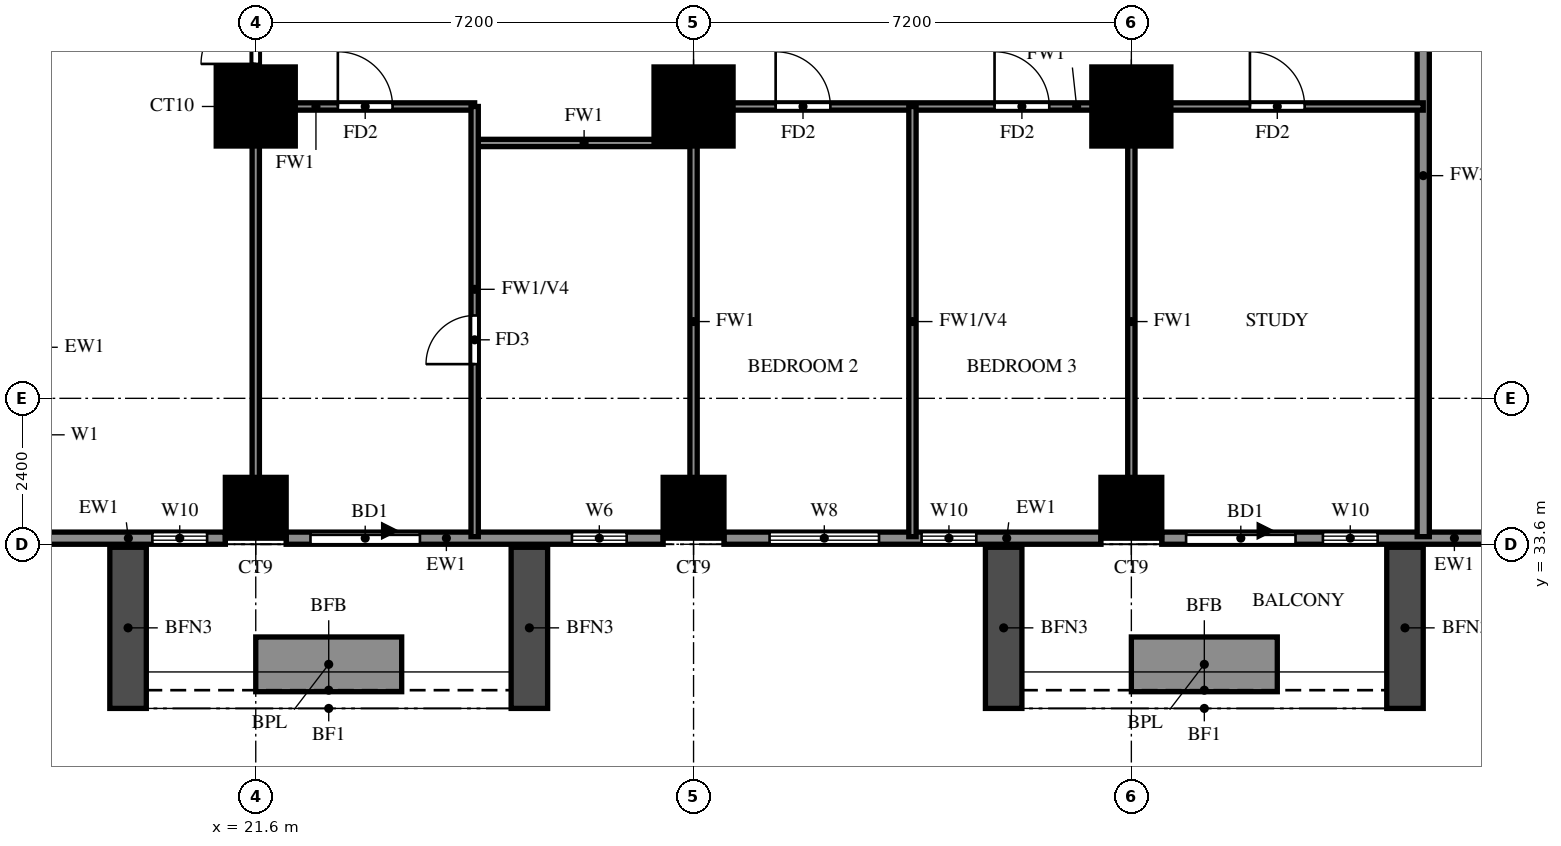
"""IFC4 building model, lengths in metres.
Left out: names, types, materials, properties, quantities, classifications, styles, units other than length and angle.
Written with IfcOpenShell. Run it as: python <this file> out.ifc"""

import sys

from ifc_helpers import new_model, si_unit, direction, frame, frame_2d, origin, origin_2d, place, context, subcontext, project, spatial, rectangle, extrude, source, transform, mapped, element, fill, save


model = new_model("IFC4")
c1 = context("Model", 3, precision=1e-05, world=origin(), true_north=direction((0.0, 1.0)))
c2 = subcontext(c1, "Body", "Model", "MODEL_VIEW")
j1 = project(units=[si_unit("LENGTHUNIT", "METRE"), si_unit("PLANEANGLEUNIT", "RADIAN")], contexts=[c1])
p1 = place(None, origin())
s1 = spatial("IfcSite", under=j1, at=p1, CompositionType="ELEMENT")
p2 = place(p1, origin())
s2 = spatial("IfcBuilding", under=s1, at=p2, CompositionType="ELEMENT")
p3 = place(p2, frame((0.0, 0.0, 76.0)))
s3 = spatial("IfcBuildingStorey", under=s2, at=p3, CompositionType="ELEMENT", Elevation=76.0)
m1 = source(origin(), c2, "Body", "SweptSolid", [
    extrude(rectangle(XDim=1.0, YDim=1.0, at=origin_2d()), origin(), (0.0, 0.0, 1.0), 3.18),
])
for number, where, z_axis, x_axis in (
    (1, (21.6, 34.2, 0.0), (0.0, 0.0, 1.0), (1.0, 0.0, 0.0)),
    (2, (28.8, 34.2, 0.0), (0.0, 0.0, 1.0), (1.0, 0.0, 0.0)),
    (3, (36.0, 34.2, 0.0), (0.0, 0.0, 1.0), (1.0, 0.0, 0.0)),
):
    element("IfcColumn", number, at=place(p3, frame(where, z_axis=z_axis, x_axis=x_axis)), inside=s3, PredefinedType="COLUMN", context=c2, shape_type="MappedRepresentation", body=[
        mapped(m1, transform((0.0, 0.0, 0.0))),
    ])
m2 = source(origin(), c2, "Body", "SweptSolid", [
    extrude(rectangle(XDim=1.3, YDim=1.3, at=origin_2d()), origin(), (0.0, 0.0, 1.0), 3.18),
])
for number, where, z_axis, x_axis in (
    (4, (21.6, 40.8, 0.0), (0.0, 0.0, 1.0), (1.0, 0.0, 0.0)),
    (5, (28.8, 40.8, 0.0), (0.0, 0.0, 1.0), (1.0, 0.0, 0.0)),
    (6, (36.0, 40.8, 0.0), (0.0, 0.0, 1.0), (1.0, 0.0, 0.0)),
):
    element("IfcColumn", number, at=place(p3, frame(where, z_axis=z_axis, x_axis=x_axis)), inside=s3, PredefinedType="COLUMN", context=c2, shape_type="MappedRepresentation", body=[
        mapped(m2, transform((0.0, 0.0, 0.0))),
    ])
p4 = place(p3, frame((18.2, 33.7, 0.0), z_axis=(0.0, 0.0, 1.0), x_axis=(1.0, 0.0, 0.0)))
e7 = element("IfcWall", 7, at=p4, inside=s3, PredefinedType="SOLIDWALL", context=c2, shape_type="SweptSolid", body=[
    extrude(rectangle(XDim=2.9, YDim=0.2, at=frame_2d((1.45, 0.0))), origin(), (0.0, 0.0, 1.0), 3.18),
])
p5 = place(p4, frame((1.7, 0.0, 0.6)))
e8 = element("IfcOpeningElement", 8, at=p5, cuts=e7, PredefinedType="OPENING", context=c2, shape_type="SweptSolid", body=[
    extrude(rectangle(XDim=0.9, YDim=2.4, at=frame_2d((0.45, 1.2))), frame((0.0, 0.11, 0.0), z_axis=(0.0, -1.0, 0.0), x_axis=(1.0, 0.0, 0.0)), (0.0, 0.0, 1.0), 0.22),
])
p6 = place(p3, frame((22.1, 33.7, 0.0), z_axis=(0.0, 0.0, 1.0), x_axis=(1.0, 0.0, 0.0)))
e9 = element("IfcWall", 9, at=p6, inside=s3, PredefinedType="SOLIDWALL", context=c2, shape_type="SweptSolid", body=[
    extrude(rectangle(XDim=6.2, YDim=0.2, at=frame_2d((3.1, 0.0))), origin(), (0.0, 0.0, 1.0), 3.18),
])
p7 = place(p6, frame((0.4, 0.0, 0.0)))
e10 = element("IfcOpeningElement", 10, at=p7, cuts=e9, PredefinedType="OPENING", context=c2, shape_type="SweptSolid", body=[
    extrude(rectangle(XDim=1.8, YDim=2.4, at=frame_2d((0.9, 1.2))), frame((0.0, 0.11, 0.0), z_axis=(0.0, -1.0, 0.0), x_axis=(1.0, 0.0, 0.0)), (0.0, 0.0, 1.0), 0.22),
])
p8 = place(p6, frame((4.7, 0.0, 1.5)))
e11 = element("IfcOpeningElement", 11, at=p8, cuts=e9, PredefinedType="OPENING", context=c2, shape_type="SweptSolid", body=[
    extrude(rectangle(XDim=0.9, YDim=0.9, at=frame_2d((0.45, 0.45))), frame((0.0, 0.11, 0.0), z_axis=(0.0, -1.0, 0.0), x_axis=(1.0, 0.0, 0.0)), (0.0, 0.0, 1.0), 0.22),
])
p9 = place(p3, frame((29.3, 33.7, 0.0), z_axis=(0.0, 0.0, 1.0), x_axis=(1.0, 0.0, 0.0)))
e12 = element("IfcWall", 12, at=p9, inside=s3, PredefinedType="SOLIDWALL", context=c2, shape_type="SweptSolid", body=[
    extrude(rectangle(XDim=6.2, YDim=0.2, at=frame_2d((3.1, 0.0))), origin(), (0.0, 0.0, 1.0), 3.18),
])
p10 = place(p9, frame((0.75, 0.0, 0.6)))
e13 = element("IfcOpeningElement", 13, at=p10, cuts=e12, PredefinedType="OPENING", context=c2, shape_type="SweptSolid", body=[
    extrude(rectangle(XDim=1.8, YDim=2.4, at=frame_2d((0.9, 1.2))), frame((0.0, 0.11, 0.0), z_axis=(0.0, -1.0, 0.0), x_axis=(1.0, 0.0, 0.0)), (0.0, 0.0, 1.0), 0.22),
])
p11 = place(p9, frame((3.25, 0.0, 0.6)))
e14 = element("IfcOpeningElement", 14, at=p11, cuts=e12, PredefinedType="OPENING", context=c2, shape_type="SweptSolid", body=[
    extrude(rectangle(XDim=0.9, YDim=2.4, at=frame_2d((0.45, 1.2))), frame((0.0, 0.11, 0.0), z_axis=(0.0, -1.0, 0.0), x_axis=(1.0, 0.0, 0.0)), (0.0, 0.0, 1.0), 0.22),
])
p12 = place(p3, frame((36.5, 33.7, 0.0), z_axis=(0.0, 0.0, 1.0), x_axis=(1.0, 0.0, 0.0)))
e15 = element("IfcWall", 15, at=p12, inside=s3, PredefinedType="SOLIDWALL", context=c2, shape_type="SweptSolid", body=[
    extrude(rectangle(XDim=5.5, YDim=0.2, at=frame_2d((2.75, 0.0))), origin(), (0.0, 0.0, 1.0), 3.18),
])
p13 = place(p12, frame((0.4, 0.0, 0.0)))
e16 = element("IfcOpeningElement", 16, at=p13, cuts=e15, PredefinedType="OPENING", context=c2, shape_type="SweptSolid", body=[
    extrude(rectangle(XDim=1.8, YDim=2.4, at=frame_2d((0.9, 1.2))), frame((0.0, 0.11, 0.0), z_axis=(0.0, -1.0, 0.0), x_axis=(1.0, 0.0, 0.0)), (0.0, 0.0, 1.0), 0.22),
])
p14 = place(p12, frame((2.65, 0.0, 0.6)))
e17 = element("IfcOpeningElement", 17, at=p14, cuts=e15, PredefinedType="OPENING", context=c2, shape_type="SweptSolid", body=[
    extrude(rectangle(XDim=0.9, YDim=2.4, at=frame_2d((0.45, 1.2))), frame((0.0, 0.11, 0.0), z_axis=(0.0, -1.0, 0.0), x_axis=(1.0, 0.0, 0.0)), (0.0, 0.0, 1.0), 0.22),
])
for number, where, z_axis, x_axis in (
    (18, (19.5, 33.55, 0.0), (0.0, 0.0, 1.0), (0.0, -1.0, 0.0)),
    (19, (26.1, 33.55, 0.0), (0.0, 0.0, 1.0), (0.0, -1.0, 0.0)),
):
    element("IfcWall", number, at=place(p3, frame(where, z_axis=z_axis, x_axis=x_axis)), inside=s3, PredefinedType="SOLIDWALL", context=c2, shape_type="SweptSolid", body=[
        extrude(rectangle(XDim=2.65, YDim=0.6, at=frame_2d((1.325, 0.0))), origin(), (0.0, 0.0, 1.0), 2.85),
    ])
p15 = place(p3, frame((21.6, 31.625, 0.0), z_axis=(0.0, 0.0, 1.0), x_axis=(1.0, 0.0, 0.0)))
e20 = element("IfcWall", 20, at=p15, inside=s3, PredefinedType="SOLIDWALL", context=c2, shape_type="SweptSolid", body=[
    extrude(rectangle(XDim=2.4, YDim=0.9, at=frame_2d((1.2, 0.0))), origin(), (0.0, 0.0, 1.0), 0.9),
])
for number, where, z_axis, x_axis in (
    (21, (33.9, 33.55, 0.0), (0.0, 0.0, 1.0), (0.0, -1.0, 0.0)),
    (22, (40.5, 33.55, 0.0), (0.0, 0.0, 1.0), (0.0, -1.0, 0.0)),
):
    element("IfcWall", number, at=place(p3, frame(where, z_axis=z_axis, x_axis=x_axis)), inside=s3, PredefinedType="SOLIDWALL", context=c2, shape_type="SweptSolid", body=[
        extrude(rectangle(XDim=2.65, YDim=0.6, at=frame_2d((1.325, 0.0))), origin(), (0.0, 0.0, 1.0), 2.85),
    ])
p16 = place(p3, frame((36.0, 31.625, 0.0), z_axis=(0.0, 0.0, 1.0), x_axis=(1.0, 0.0, 0.0)))
e23 = element("IfcWall", 23, at=p16, inside=s3, PredefinedType="SOLIDWALL", context=c2, shape_type="SweptSolid", body=[
    extrude(rectangle(XDim=2.4, YDim=0.9, at=frame_2d((1.2, 0.0))), origin(), (0.0, 0.0, 1.0), 0.9),
])
p17 = place(p3, frame((40.8, 33.725, 0.0), z_axis=(0.0, 0.0, 1.0), x_axis=(0.0, 1.0, 0.0)))
e24 = element("IfcWall", 24, at=p17, inside=s3, PredefinedType="SOLIDWALL", context=c2, shape_type="SweptSolid", body=[
    extrude(rectangle(XDim=11.875, YDim=0.2, at=frame_2d((5.938, 0.0))), origin(), (0.0, 0.0, 1.0), 2.28),
])
p18 = place(p3, frame((25.2, 40.2, 0.0), z_axis=(0.0, 0.0, 1.0), x_axis=(1.0, 0.0, 0.0)))
e25 = element("IfcWall", 25, at=p18, inside=s3, PredefinedType="PARTITIONING", context=c2, shape_type="SweptSolid", body=[
    extrude(rectangle(XDim=3.6, YDim=0.12, at=frame_2d((1.8, 0.0))), origin(), (0.0, 0.0, 1.0), 3.18),
])
p19 = place(p3, frame((21.6, 40.8, 0.0), z_axis=(0.0, 0.0, 1.0), x_axis=(1.0, 0.0, 0.0)))
e26 = element("IfcWall", 26, at=p19, inside=s3, PredefinedType="PARTITIONING", context=c2, shape_type="SweptSolid", body=[
    extrude(rectangle(XDim=3.6, YDim=0.12, at=frame_2d((1.8, 0.0))), origin(), (0.0, 0.0, 1.0), 3.18),
])
p20 = place(p19, frame((1.35, 0.0, 0.0)))
e27 = element("IfcOpeningElement", 27, at=p20, cuts=e26, PredefinedType="OPENING", context=c2, shape_type="SweptSolid", body=[
    extrude(rectangle(XDim=0.9, YDim=2.1, at=frame_2d((0.45, 1.05))), frame((0.0, 0.07, 0.0), z_axis=(0.0, -1.0, 0.0), x_axis=(1.0, 0.0, 0.0)), (0.0, 0.0, 1.0), 0.14),
])
p21 = place(p3, frame((28.8, 40.8, 0.0), z_axis=(0.0, 0.0, 1.0), x_axis=(1.0, 0.0, 0.0)))
e28 = element("IfcWall", 28, at=p21, inside=s3, PredefinedType="PARTITIONING", context=c2, shape_type="SweptSolid", body=[
    extrude(rectangle(XDim=12.0, YDim=0.12, at=frame_2d((6.0, 0.0))), origin(), (0.0, 0.0, 1.0), 3.18),
])
p22 = place(p21, frame((1.35, 0.0, 0.0)))
e29 = element("IfcOpeningElement", 29, at=p22, cuts=e28, PredefinedType="OPENING", context=c2, shape_type="SweptSolid", body=[
    extrude(rectangle(XDim=0.9, YDim=2.1, at=frame_2d((0.45, 1.05))), frame((0.0, 0.07, 0.0), z_axis=(0.0, -1.0, 0.0), x_axis=(1.0, 0.0, 0.0)), (0.0, 0.0, 1.0), 0.14),
])
p23 = place(p21, frame((4.95, 0.0, 0.0)))
e30 = element("IfcOpeningElement", 30, at=p23, cuts=e28, PredefinedType="OPENING", context=c2, shape_type="SweptSolid", body=[
    extrude(rectangle(XDim=0.9, YDim=2.1, at=frame_2d((0.45, 1.05))), frame((0.0, 0.07, 0.0), z_axis=(0.0, -1.0, 0.0), x_axis=(1.0, 0.0, 0.0)), (0.0, 0.0, 1.0), 0.14),
])
p24 = place(p21, frame((9.15, 0.0, 0.0)))
e31 = element("IfcOpeningElement", 31, at=p24, cuts=e28, PredefinedType="OPENING", context=c2, shape_type="SweptSolid", body=[
    extrude(rectangle(XDim=0.9, YDim=2.1, at=frame_2d((0.45, 1.05))), frame((0.0, 0.07, 0.0), z_axis=(0.0, -1.0, 0.0), x_axis=(1.0, 0.0, 0.0)), (0.0, 0.0, 1.0), 0.14),
])
p25 = place(p3, frame((21.6, 33.725, 0.0), z_axis=(0.0, 0.0, 1.0), x_axis=(0.0, 1.0, 0.0)))
e32 = element("IfcWall", 32, at=p25, inside=s3, PredefinedType="PARTITIONING", context=c2, shape_type="SweptSolid", body=[
    extrude(rectangle(XDim=39.475, YDim=0.12, at=frame_2d((19.737, 0.0))), origin(), (0.0, 0.0, 1.0), 3.18),
])
p26 = place(p25, frame((7.775, 0.0, 0.0)))
e33 = element("IfcOpeningElement", 33, at=p26, cuts=e32, PredefinedType="OPENING", context=c2, shape_type="SweptSolid", body=[
    extrude(rectangle(XDim=0.9, YDim=2.1, at=frame_2d((0.45, 1.05))), frame((0.0, 0.07, 0.0), z_axis=(0.0, -1.0, 0.0), x_axis=(1.0, 0.0, 0.0)), (0.0, 0.0, 1.0), 0.14),
])
p27 = place(p25, frame((17.125, 0.0, 0.0)))
e34 = element("IfcOpeningElement", 34, at=p27, cuts=e32, PredefinedType="OPENING", context=c2, shape_type="SweptSolid", body=[
    extrude(rectangle(XDim=1.5, YDim=2.1, at=frame_2d((0.75, 1.05))), frame((0.0, 0.07, 0.0), z_axis=(0.0, -1.0, 0.0), x_axis=(1.0, 0.0, 0.0)), (0.0, 0.0, 1.0), 0.14),
])
p28 = place(p25, frame((22.825, 0.0, 0.0)))
e35 = element("IfcOpeningElement", 35, at=p28, cuts=e32, PredefinedType="OPENING", context=c2, shape_type="SweptSolid", body=[
    extrude(rectangle(XDim=0.9, YDim=2.1, at=frame_2d((0.45, 1.05))), frame((0.0, 0.07, 0.0), z_axis=(0.0, -1.0, 0.0), x_axis=(1.0, 0.0, 0.0)), (0.0, 0.0, 1.0), 0.14),
])
p29 = place(p25, frame((26.425, 0.0, 0.0)))
e36 = element("IfcOpeningElement", 36, at=p29, cuts=e32, PredefinedType="OPENING", context=c2, shape_type="SweptSolid", body=[
    extrude(rectangle(XDim=0.9, YDim=2.1, at=frame_2d((0.45, 1.05))), frame((0.0, 0.07, 0.0), z_axis=(0.0, -1.0, 0.0), x_axis=(1.0, 0.0, 0.0)), (0.0, 0.0, 1.0), 0.14),
])
p30 = place(p25, frame((30.025, 0.0, 0.0)))
e37 = element("IfcOpeningElement", 37, at=p30, cuts=e32, PredefinedType="OPENING", context=c2, shape_type="SweptSolid", body=[
    extrude(rectangle(XDim=0.9, YDim=2.1, at=frame_2d((0.45, 1.05))), frame((0.0, 0.07, 0.0), z_axis=(0.0, -1.0, 0.0), x_axis=(1.0, 0.0, 0.0)), (0.0, 0.0, 1.0), 0.14),
])
p31 = place(p25, frame((33.625, 0.0, 0.0)))
e38 = element("IfcOpeningElement", 38, at=p31, cuts=e32, PredefinedType="OPENING", context=c2, shape_type="SweptSolid", body=[
    extrude(rectangle(XDim=0.9, YDim=2.1, at=frame_2d((0.45, 1.05))), frame((0.0, 0.07, 0.0), z_axis=(0.0, -1.0, 0.0), x_axis=(1.0, 0.0, 0.0)), (0.0, 0.0, 1.0), 0.14),
])
p32 = place(p25, frame((37.225, 0.0, 0.0)))
e39 = element("IfcOpeningElement", 39, at=p32, cuts=e32, PredefinedType="OPENING", context=c2, shape_type="SweptSolid", body=[
    extrude(rectangle(XDim=0.9, YDim=2.1, at=frame_2d((0.45, 1.05))), frame((0.0, 0.07, 0.0), z_axis=(0.0, -1.0, 0.0), x_axis=(1.0, 0.0, 0.0)), (0.0, 0.0, 1.0), 0.14),
])
p33 = place(p3, frame((25.2, 33.725, 0.0), z_axis=(0.0, 0.0, 1.0), x_axis=(0.0, 1.0, 0.0)))
e40 = element("IfcWall", 40, at=p33, inside=s3, PredefinedType="PARTITIONING", context=c2, shape_type="SweptSolid", body=[
    extrude(rectangle(XDim=7.075, YDim=0.12, at=frame_2d((3.538, 0.0))), origin(), (0.0, 0.0, 1.0), 2.28),
])
p34 = place(p33, frame((2.837, 0.0, 0.0)))
e41 = element("IfcOpeningElement", 41, at=p34, cuts=e40, PredefinedType="OPENING", context=c2, shape_type="SweptSolid", body=[
    extrude(rectangle(XDim=0.8, YDim=2.1, at=frame_2d((0.4, 1.05))), frame((0.0, 0.07, 0.0), z_axis=(0.0, -1.0, 0.0), x_axis=(1.0, 0.0, 0.0)), (0.0, 0.0, 1.0), 0.14),
])
p35 = place(p3, frame((28.8, 33.725, 0.0), z_axis=(0.0, 0.0, 1.0), x_axis=(0.0, 1.0, 0.0)))
e42 = element("IfcWall", 42, at=p35, inside=s3, PredefinedType="PARTITIONING", context=c2, shape_type="SweptSolid", body=[
    extrude(rectangle(XDim=7.075, YDim=0.12, at=frame_2d((3.538, 0.0))), origin(), (0.0, 0.0, 1.0), 3.18),
])
p36 = place(p3, frame((32.4, 33.725, 0.0), z_axis=(0.0, 0.0, 1.0), x_axis=(0.0, 1.0, 0.0)))
e43 = element("IfcWall", 43, at=p36, inside=s3, PredefinedType="PARTITIONING", context=c2, shape_type="SweptSolid", body=[
    extrude(rectangle(XDim=7.075, YDim=0.12, at=frame_2d((3.538, 0.0))), origin(), (0.0, 0.0, 1.0), 2.28),
])
p37 = place(p3, frame((36.0, 33.725, 0.0), z_axis=(0.0, 0.0, 1.0), x_axis=(0.0, 1.0, 0.0)))
e44 = element("IfcWall", 44, at=p37, inside=s3, PredefinedType="PARTITIONING", context=c2, shape_type="SweptSolid", body=[
    extrude(rectangle(XDim=7.075, YDim=0.12, at=frame_2d((3.538, 0.0))), origin(), (0.0, 0.0, 1.0), 3.18),
])
p38 = place(p5, origin())
e45 = element("IfcWindow", 45, at=p38, inside=s3, PartitioningType="SINGLE_PANEL", PredefinedType="WINDOW", context=c2, shape_type="SweptSolid", body=[
    extrude(rectangle(XDim=0.9, YDim=2.4, at=frame_2d((0.45, 1.2))), frame((0.0, 0.03, 0.0), z_axis=(0.0, -1.0, 0.0), x_axis=(1.0, 0.0, 0.0)), (0.0, 0.0, 1.0), 0.06),
])
fill(e8, e45)
p39 = place(p7, origin())
e46 = element("IfcDoor", 46, at=p39, inside=s3, OperationType="DOUBLE_DOOR_SLIDING", PredefinedType="DOOR", context=c2, shape_type="SweptSolid", body=[
    extrude(rectangle(XDim=1.8, YDim=2.4, at=frame_2d((0.9, 1.2))), frame((0.0, 0.025, 0.0), z_axis=(0.0, -1.0, 0.0), x_axis=(1.0, 0.0, 0.0)), (0.0, 0.0, 1.0), 0.05),
])
fill(e10, e46)
p40 = place(p8, origin())
e47 = element("IfcWindow", 47, at=p40, inside=s3, PartitioningType="SINGLE_PANEL", PredefinedType="WINDOW", context=c2, shape_type="SweptSolid", body=[
    extrude(rectangle(XDim=0.9, YDim=0.9, at=frame_2d((0.45, 0.45))), frame((0.0, 0.03, 0.0), z_axis=(0.0, -1.0, 0.0), x_axis=(1.0, 0.0, 0.0)), (0.0, 0.0, 1.0), 0.06),
])
fill(e11, e47)
p41 = place(p10, origin())
e48 = element("IfcWindow", 48, at=p41, inside=s3, PartitioningType="DOUBLE_PANEL_VERTICAL", PredefinedType="WINDOW", context=c2, shape_type="SweptSolid", body=[
    extrude(rectangle(XDim=1.8, YDim=2.4, at=frame_2d((0.9, 1.2))), frame((0.0, 0.03, 0.0), z_axis=(0.0, -1.0, 0.0), x_axis=(1.0, 0.0, 0.0)), (0.0, 0.0, 1.0), 0.06),
])
fill(e13, e48)
p42 = place(p11, origin())
e49 = element("IfcWindow", 49, at=p42, inside=s3, PartitioningType="SINGLE_PANEL", PredefinedType="WINDOW", context=c2, shape_type="SweptSolid", body=[
    extrude(rectangle(XDim=0.9, YDim=2.4, at=frame_2d((0.45, 1.2))), frame((0.0, 0.03, 0.0), z_axis=(0.0, -1.0, 0.0), x_axis=(1.0, 0.0, 0.0)), (0.0, 0.0, 1.0), 0.06),
])
fill(e14, e49)
p43 = place(p13, origin())
e50 = element("IfcDoor", 50, at=p43, inside=s3, OperationType="DOUBLE_DOOR_SLIDING", PredefinedType="DOOR", context=c2, shape_type="SweptSolid", body=[
    extrude(rectangle(XDim=1.8, YDim=2.4, at=frame_2d((0.9, 1.2))), frame((0.0, 0.025, 0.0), z_axis=(0.0, -1.0, 0.0), x_axis=(1.0, 0.0, 0.0)), (0.0, 0.0, 1.0), 0.05),
])
fill(e16, e50)
p44 = place(p14, origin())
e51 = element("IfcWindow", 51, at=p44, inside=s3, PartitioningType="SINGLE_PANEL", PredefinedType="WINDOW", context=c2, shape_type="SweptSolid", body=[
    extrude(rectangle(XDim=0.9, YDim=2.4, at=frame_2d((0.45, 1.2))), frame((0.0, 0.03, 0.0), z_axis=(0.0, -1.0, 0.0), x_axis=(1.0, 0.0, 0.0)), (0.0, 0.0, 1.0), 0.06),
])
fill(e17, e51)
p45 = place(p26, origin())
e52 = element("IfcDoor", 52, at=p45, inside=s3, OperationType="SINGLE_SWING_RIGHT", PredefinedType="DOOR", context=c2, shape_type="SweptSolid", body=[
    extrude(rectangle(XDim=0.9, YDim=2.1, at=frame_2d((0.45, 1.05))), frame((0.0, 0.025, 0.0), z_axis=(0.0, -1.0, 0.0), x_axis=(1.0, 0.0, 0.0)), (0.0, 0.0, 1.0), 0.05),
])
fill(e33, e52)
p46 = place(p20, origin())
e53 = element("IfcDoor", 53, at=p46, inside=s3, OperationType="SINGLE_SWING_RIGHT", PredefinedType="DOOR", context=c2, shape_type="SweptSolid", body=[
    extrude(rectangle(XDim=0.9, YDim=2.1, at=frame_2d((0.45, 1.05))), frame((0.0, 0.025, 0.0), z_axis=(0.0, -1.0, 0.0), x_axis=(1.0, 0.0, 0.0)), (0.0, 0.0, 1.0), 0.05),
])
fill(e27, e53)
p47 = place(p34, origin())
e54 = element("IfcDoor", 54, at=p47, inside=s3, OperationType="SINGLE_SWING_LEFT", PredefinedType="DOOR", context=c2, shape_type="SweptSolid", body=[
    extrude(rectangle(XDim=0.8, YDim=2.1, at=frame_2d((0.4, 1.05))), frame((0.0, 0.025, 0.0), z_axis=(0.0, -1.0, 0.0), x_axis=(1.0, 0.0, 0.0)), (0.0, 0.0, 1.0), 0.05),
])
fill(e41, e54)
p48 = place(p22, origin())
e55 = element("IfcDoor", 55, at=p48, inside=s3, OperationType="SINGLE_SWING_LEFT", PredefinedType="DOOR", context=c2, shape_type="SweptSolid", body=[
    extrude(rectangle(XDim=0.9, YDim=2.1, at=frame_2d((0.45, 1.05))), frame((0.0, 0.025, 0.0), z_axis=(0.0, -1.0, 0.0), x_axis=(1.0, 0.0, 0.0)), (0.0, 0.0, 1.0), 0.05),
])
fill(e29, e55)
p49 = place(p23, origin())
e56 = element("IfcDoor", 56, at=p49, inside=s3, OperationType="SINGLE_SWING_RIGHT", PredefinedType="DOOR", context=c2, shape_type="SweptSolid", body=[
    extrude(rectangle(XDim=0.9, YDim=2.1, at=frame_2d((0.45, 1.05))), frame((0.0, 0.025, 0.0), z_axis=(0.0, -1.0, 0.0), x_axis=(1.0, 0.0, 0.0)), (0.0, 0.0, 1.0), 0.05),
])
fill(e30, e56)
p50 = place(p24, origin())
e57 = element("IfcDoor", 57, at=p50, inside=s3, OperationType="SINGLE_SWING_LEFT", PredefinedType="DOOR", context=c2, shape_type="SweptSolid", body=[
    extrude(rectangle(XDim=0.9, YDim=2.1, at=frame_2d((0.45, 1.05))), frame((0.0, 0.025, 0.0), z_axis=(0.0, -1.0, 0.0), x_axis=(1.0, 0.0, 0.0)), (0.0, 0.0, 1.0), 0.05),
])
fill(e31, e57)
save(model, sys.argv[1])
